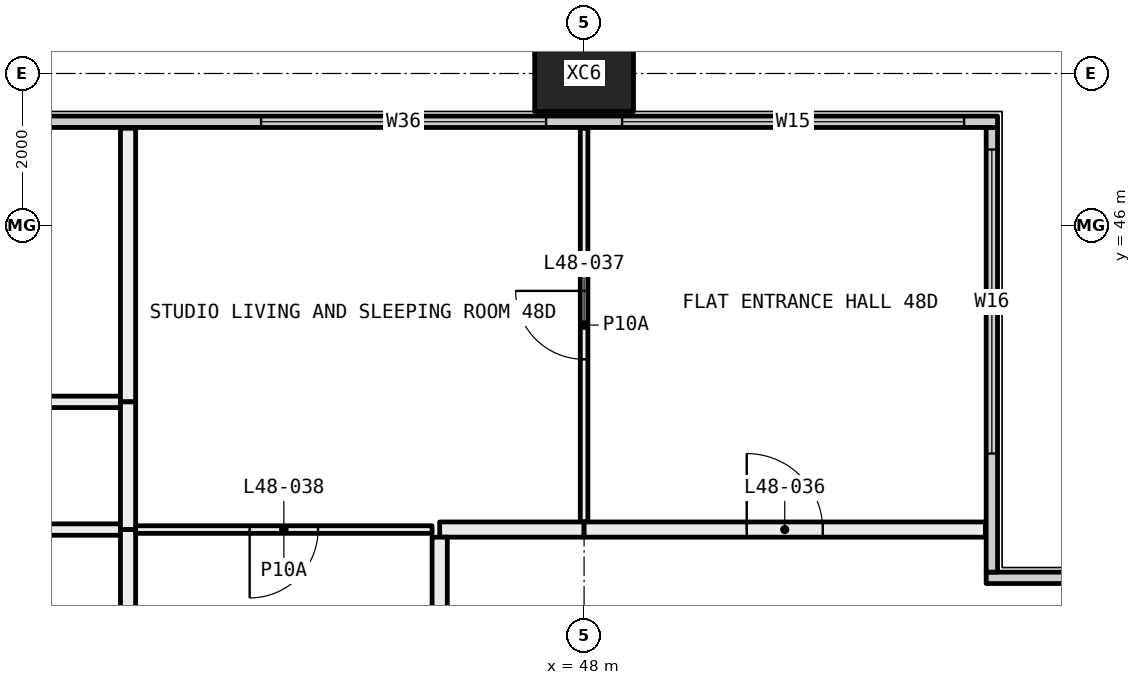
"""IFC4 building model, lengths in metres.
Left out: names, types, materials, properties, quantities, classifications, styles, units other than length and angle.
Written with IfcOpenShell. Run it as: python <this file> out.ifc"""

import sys

from ifc_helpers import new_model, si_unit, direction, frame, frame_2d, origin, origin_2d, place, context, subcontext, project, spatial, rectangle, hollow_rectangle, extrude, element, fill, save


model = new_model("IFC4")
c1 = context("Model", 3, precision=1e-05, world=origin(), true_north=direction((0.0, 1.0)))
c2 = subcontext(c1, "Body", "Model", "MODEL_VIEW")
j1 = project(units=[si_unit("LENGTHUNIT", "METRE"), si_unit("PLANEANGLEUNIT", "RADIAN")], contexts=[c1])
p1 = place(None, origin())
s1 = spatial("IfcSite", under=j1, at=p1, CompositionType="ELEMENT")
p2 = place(p1, origin())
s2 = spatial("IfcBuilding", under=s1, at=p2, CompositionType="ELEMENT")
p3 = place(p2, frame((0.0, 0.0, 182.4)))
s3 = spatial("IfcBuildingStorey", under=s2, at=p3, CompositionType="ELEMENT", Elevation=182.4)
p4 = place(p3, frame((48.0, 48.0, -0.4), z_axis=(0.0, 0.0, 1.0), x_axis=(1.0, 0.0, 0.0)))
e1 = element("IfcColumn", 1, at=p4, inside=s3, PredefinedType="COLUMN", context=c2, shape_type="SweptSolid", body=[
    extrude(hollow_rectangle(XDim=1.3, YDim=1.0, WallThickness=0.05, at=origin_2d()), origin(), (0.0, 0.0, 1.0), 3.45),
])
p5 = place(p3, frame((53.29, 41.365, 0.0), z_axis=(0.0, 0.0, 1.0), x_axis=(1.0, 0.0, 0.0)))
e2 = element("IfcWall", 2, at=p5, inside=s3, PredefinedType="ELEMENTEDWALL", context=c2, shape_type="SweptSolid", body=[
    extrude(rectangle(XDim=6.15, YDim=0.15, at=frame_2d((3.075, 0.0))), origin(), (0.0, 0.0, 1.0), 3.05),
])
p6 = place(p5, frame((1.71, 0.0, 0.45)))
e3 = element("IfcOpeningElement", 3, at=p6, cuts=e2, PredefinedType="OPENING", context=c2, shape_type="SweptSolid", body=[
    extrude(rectangle(XDim=4.0, YDim=2.55, at=frame_2d((2.0, 1.275))), frame((0.0, 0.085, 0.0), z_axis=(0.0, -1.0, 0.0), x_axis=(1.0, 0.0, 0.0)), (0.0, 0.0, 1.0), 0.17),
])
p7 = place(p3, frame((53.365, 41.44, 0.0), z_axis=(0.0, 0.0, 1.0), x_axis=(0.0, 1.0, 0.0)))
e4 = element("IfcWall", 4, at=p7, inside=s3, PredefinedType="ELEMENTEDWALL", context=c2, shape_type="SweptSolid", body=[
    extrude(rectangle(XDim=5.85, YDim=0.15, at=frame_2d((2.925, 0.0))), origin(), (0.0, 0.0, 1.0), 3.05),
])
p8 = place(p7, frame((1.56, 0.0, 0.45)))
e5 = element("IfcOpeningElement", 5, at=p8, cuts=e4, PredefinedType="OPENING", context=c2, shape_type="SweptSolid", body=[
    extrude(rectangle(XDim=4.0, YDim=2.55, at=frame_2d((2.0, 1.275))), frame((0.0, 0.085, 0.0), z_axis=(0.0, -1.0, 0.0), x_axis=(1.0, 0.0, 0.0)), (0.0, 0.0, 1.0), 0.17),
])
p9 = place(p3, frame((6.56, 47.365, 0.0), z_axis=(0.0, 0.0, 1.0), x_axis=(1.0, 0.0, 0.0)))
e6 = element("IfcWall", 6, at=p9, inside=s3, PredefinedType="ELEMENTEDWALL", context=c2, shape_type="SweptSolid", body=[
    extrude(rectangle(XDim=46.88, YDim=0.15, at=frame_2d((23.44, 0.0))), origin(), (0.0, 0.0, 1.0), 3.05),
])
p10 = place(p9, frame((0.44, 0.0, 0.45)))
e7 = element("IfcOpeningElement", 7, at=p10, cuts=e6, PredefinedType="OPENING", context=c2, shape_type="SweptSolid", body=[
    extrude(rectangle(XDim=4.5, YDim=2.55, at=frame_2d((2.25, 1.275))), frame((0.0, 0.085, 0.0), z_axis=(0.0, -1.0, 0.0), x_axis=(1.0, 0.0, 0.0)), (0.0, 0.0, 1.0), 0.17),
])
p11 = place(p9, frame((5.94, 0.0, 0.45)))
e8 = element("IfcOpeningElement", 8, at=p11, cuts=e6, PredefinedType="OPENING", context=c2, shape_type="SweptSolid", body=[
    extrude(rectangle(XDim=3.75, YDim=2.55, at=frame_2d((1.875, 1.275))), frame((0.0, 0.085, 0.0), z_axis=(0.0, -1.0, 0.0), x_axis=(1.0, 0.0, 0.0)), (0.0, 0.0, 1.0), 0.17),
])
p12 = place(p9, frame((13.19, 0.0, 0.45)))
e9 = element("IfcOpeningElement", 9, at=p12, cuts=e6, PredefinedType="OPENING", context=c2, shape_type="SweptSolid", body=[
    extrude(rectangle(XDim=3.75, YDim=2.55, at=frame_2d((1.875, 1.275))), frame((0.0, 0.085, 0.0), z_axis=(0.0, -1.0, 0.0), x_axis=(1.0, 0.0, 0.0)), (0.0, 0.0, 1.0), 0.17),
])
p13 = place(p9, frame((17.94, 0.0, 0.45)))
e10 = element("IfcOpeningElement", 10, at=p13, cuts=e6, PredefinedType="OPENING", context=c2, shape_type="SweptSolid", body=[
    extrude(rectangle(XDim=3.75, YDim=2.55, at=frame_2d((1.875, 1.275))), frame((0.0, 0.085, 0.0), z_axis=(0.0, -1.0, 0.0), x_axis=(1.0, 0.0, 0.0)), (0.0, 0.0, 1.0), 0.17),
])
p14 = place(p9, frame((25.19, 0.0, 0.45)))
e11 = element("IfcOpeningElement", 11, at=p14, cuts=e6, PredefinedType="OPENING", context=c2, shape_type="SweptSolid", body=[
    extrude(rectangle(XDim=0.75, YDim=2.55, at=frame_2d((0.375, 1.275))), frame((0.0, 0.085, 0.0), z_axis=(0.0, -1.0, 0.0), x_axis=(1.0, 0.0, 0.0)), (0.0, 0.0, 1.0), 0.17),
])
p15 = place(p9, frame((26.94, 0.0, 0.45)))
e12 = element("IfcOpeningElement", 12, at=p15, cuts=e6, PredefinedType="OPENING", context=c2, shape_type="SweptSolid", body=[
    extrude(rectangle(XDim=2.0, YDim=2.55, at=frame_2d((1.0, 1.275))), frame((0.0, 0.085, 0.0), z_axis=(0.0, -1.0, 0.0), x_axis=(1.0, 0.0, 0.0)), (0.0, 0.0, 1.0), 0.17),
])
p16 = place(p9, frame((29.94, 0.0, 0.45)))
e13 = element("IfcOpeningElement", 13, at=p16, cuts=e6, PredefinedType="OPENING", context=c2, shape_type="SweptSolid", body=[
    extrude(rectangle(XDim=3.75, YDim=2.55, at=frame_2d((1.875, 1.275))), frame((0.0, 0.085, 0.0), z_axis=(0.0, -1.0, 0.0), x_axis=(1.0, 0.0, 0.0)), (0.0, 0.0, 1.0), 0.17),
])
p17 = place(p9, frame((37.19, 0.0, 0.45)))
e14 = element("IfcOpeningElement", 14, at=p17, cuts=e6, PredefinedType="OPENING", context=c2, shape_type="SweptSolid", body=[
    extrude(rectangle(XDim=3.75, YDim=2.55, at=frame_2d((1.875, 1.275))), frame((0.0, 0.085, 0.0), z_axis=(0.0, -1.0, 0.0), x_axis=(1.0, 0.0, 0.0)), (0.0, 0.0, 1.0), 0.17),
])
p18 = place(p9, frame((41.94, 0.0, 0.45)))
e15 = element("IfcOpeningElement", 15, at=p18, cuts=e6, PredefinedType="OPENING", context=c2, shape_type="SweptSolid", body=[
    extrude(rectangle(XDim=4.5, YDim=2.55, at=frame_2d((2.25, 1.275))), frame((0.0, 0.085, 0.0), z_axis=(0.0, -1.0, 0.0), x_axis=(1.0, 0.0, 0.0)), (0.0, 0.0, 1.0), 0.17),
])
p19 = place(p3, frame((36.075, 43.68, 0.0), z_axis=(0.0, 0.0, 1.0), x_axis=(1.0, 0.0, 0.0)))
e16 = element("IfcWall", 16, at=p19, inside=s3, PredefinedType="PARTITIONING", context=c2, shape_type="SweptSolid", body=[
    extrude(rectangle(XDim=5.825, YDim=0.15, at=frame_2d((2.913, 0.0))), origin(), (0.0, 0.0, 1.0), 2.45),
])
p20 = place(p3, frame((42.0, 43.68, 0.0), z_axis=(0.0, 0.0, 1.0), x_axis=(0.0, 1.0, 0.0)))
e17 = element("IfcWall", 17, at=p20, inside=s3, PredefinedType="PARTITIONING", context=c2, shape_type="SweptSolid", body=[
    extrude(rectangle(XDim=3.6, YDim=0.2, at=frame_2d((1.8, 0.0))), origin(), (0.0, 0.0, 1.0), 3.05),
])
p21 = place(p3, frame((36.075, 42.0, 0.0), z_axis=(0.0, 0.0, 1.0), x_axis=(1.0, 0.0, 0.0)))
e18 = element("IfcWall", 18, at=p21, inside=s3, PredefinedType="PARTITIONING", context=c2, shape_type="SweptSolid", body=[
    extrude(rectangle(XDim=5.825, YDim=0.15, at=frame_2d((2.913, 0.0))), origin(), (0.0, 0.0, 1.0), 2.45),
])
p22 = place(p3, frame((42.0, 42.0, 0.0), z_axis=(0.0, 0.0, 1.0), x_axis=(0.0, 1.0, 0.0)))
e19 = element("IfcWall", 19, at=p22, inside=s3, PredefinedType="PARTITIONING", context=c2, shape_type="SweptSolid", body=[
    extrude(rectangle(XDim=1.68, YDim=0.2, at=frame_2d((0.84, 0.0))), origin(), (0.0, 0.0, 1.0), 3.05),
])
p23 = place(p3, frame((42.0, 36.1, 0.0), z_axis=(0.0, 0.0, 1.0), x_axis=(0.0, 1.0, 0.0)))
e20 = element("IfcWall", 20, at=p23, inside=s3, PredefinedType="PARTITIONING", context=c2, shape_type="SweptSolid", body=[
    extrude(rectangle(XDim=5.9, YDim=0.2, at=frame_2d((2.95, 0.0))), origin(), (0.0, 0.0, 1.0), 3.05),
])
p24 = place(p3, frame((48.0, 42.1, 0.0), z_axis=(0.0, 0.0, 1.0), x_axis=(0.0, 1.0, 0.0)))
e21 = element("IfcWall", 21, at=p24, inside=s3, PredefinedType="PARTITIONING", context=c2, shape_type="SweptSolid", body=[
    extrude(rectangle(XDim=5.18, YDim=0.1, at=frame_2d((2.59, 0.0))), origin(), (0.0, 0.0, 1.0), 3.05),
])
p25 = place(p24, frame((2.14, 0.0, 0.0)))
e22 = element("IfcOpeningElement", 22, at=p25, cuts=e21, PredefinedType="OPENING", context=c2, shape_type="SweptSolid", body=[
    extrude(rectangle(XDim=0.9, YDim=2.1, at=frame_2d((0.45, 1.05))), frame((0.0, 0.06, 0.0), z_axis=(0.0, -1.0, 0.0), x_axis=(1.0, 0.0, 0.0)), (0.0, 0.0, 1.0), 0.12),
])
p26 = place(p3, frame((42.1, 42.0, 0.0), z_axis=(0.0, 0.0, 1.0), x_axis=(1.0, 0.0, 0.0)))
e23 = element("IfcWall", 23, at=p26, inside=s3, PredefinedType="PARTITIONING", context=c2, shape_type="SweptSolid", body=[
    extrude(rectangle(XDim=3.9, YDim=0.1, at=frame_2d((1.95, 0.0))), origin(), (0.0, 0.0, 1.0), 3.05),
])
p27 = place(p26, frame((1.5, 0.0, 0.0)))
e24 = element("IfcOpeningElement", 24, at=p27, cuts=e23, PredefinedType="OPENING", context=c2, shape_type="SweptSolid", body=[
    extrude(rectangle(XDim=0.9, YDim=2.1, at=frame_2d((0.45, 1.05))), frame((0.0, 0.06, 0.0), z_axis=(0.0, -1.0, 0.0), x_axis=(1.0, 0.0, 0.0)), (0.0, 0.0, 1.0), 0.12),
])
p28 = place(p3, frame((46.1, 42.0, 0.0), z_axis=(0.0, 0.0, 1.0), x_axis=(1.0, 0.0, 0.0)))
e25 = element("IfcWall", 25, at=p28, inside=s3, PredefinedType="PARTITIONING", context=c2, shape_type="SweptSolid", body=[
    extrude(rectangle(XDim=1.9, YDim=0.2, at=frame_2d((0.95, 0.0))), origin(), (0.0, 0.0, 1.0), 3.05),
])
p29 = place(p3, frame((48.0, 42.0, 0.0), z_axis=(0.0, 0.0, 1.0), x_axis=(1.0, 0.0, 0.0)))
e26 = element("IfcWall", 26, at=p29, inside=s3, PredefinedType="PARTITIONING", context=c2, shape_type="SweptSolid", body=[
    extrude(rectangle(XDim=5.28, YDim=0.2, at=frame_2d((2.64, 0.0))), origin(), (0.0, 0.0, 1.0), 3.05),
])
p30 = place(p29, frame((2.14, 0.0, 0.0)))
e27 = element("IfcOpeningElement", 27, at=p30, cuts=e26, PredefinedType="OPENING", context=c2, shape_type="SweptSolid", body=[
    extrude(rectangle(XDim=1.0, YDim=2.1, at=frame_2d((0.5, 1.05))), frame((0.0, 0.11, 0.0), z_axis=(0.0, -1.0, 0.0), x_axis=(1.0, 0.0, 0.0)), (0.0, 0.0, 1.0), 0.22),
])
p31 = place(p3, frame((46.1, 36.1, 0.0), z_axis=(0.0, 0.0, 1.0), x_axis=(0.0, 1.0, 0.0)))
e28 = element("IfcWall", 28, at=p31, inside=s3, PredefinedType="PARTITIONING", context=c2, shape_type="SweptSolid", body=[
    extrude(rectangle(XDim=5.8, YDim=0.2, at=frame_2d((2.9, 0.0))), origin(), (0.0, 0.0, 1.0), 3.05),
])
p32 = place(p8, origin())
e29 = element("IfcWindow", 29, at=p32, inside=s3, PartitioningType="SINGLE_PANEL", PredefinedType="WINDOW", context=c2, shape_type="SweptSolid", body=[
    extrude(rectangle(XDim=4.0, YDim=2.55, at=frame_2d((2.0, 1.275))), frame((0.0, 0.03, 0.0), z_axis=(0.0, -1.0, 0.0), x_axis=(1.0, 0.0, 0.0)), (0.0, 0.0, 1.0), 0.06),
])
fill(e5, e29)
p33 = place(p17, origin())
e30 = element("IfcWindow", 30, at=p33, inside=s3, PartitioningType="SINGLE_PANEL", PredefinedType="WINDOW", context=c2, shape_type="SweptSolid", body=[
    extrude(rectangle(XDim=3.75, YDim=2.55, at=frame_2d((1.875, 1.275))), frame((0.0, 0.03, 0.0), z_axis=(0.0, -1.0, 0.0), x_axis=(1.0, 0.0, 0.0)), (0.0, 0.0, 1.0), 0.06),
])
fill(e14, e30)
p34 = place(p18, origin())
e31 = element("IfcWindow", 31, at=p34, inside=s3, PartitioningType="SINGLE_PANEL", PredefinedType="WINDOW", context=c2, shape_type="SweptSolid", body=[
    extrude(rectangle(XDim=4.5, YDim=2.55, at=frame_2d((2.25, 1.275))), frame((0.0, 0.03, 0.0), z_axis=(0.0, -1.0, 0.0), x_axis=(1.0, 0.0, 0.0)), (0.0, 0.0, 1.0), 0.06),
])
fill(e15, e31)
p35 = place(p30, origin())
e32 = element("IfcDoor", 32, at=p35, inside=s3, OperationType="SINGLE_SWING_RIGHT", PredefinedType="DOOR", context=c2, shape_type="SweptSolid", body=[
    extrude(rectangle(XDim=1.0, YDim=2.1, at=frame_2d((0.5, 1.05))), frame((0.0, 0.025, 0.0), z_axis=(0.0, -1.0, 0.0), x_axis=(1.0, 0.0, 0.0)), (0.0, 0.0, 1.0), 0.05),
])
fill(e27, e32)
p36 = place(p25, origin())
e33 = element("IfcDoor", 33, at=p36, inside=s3, OperationType="SINGLE_SWING_LEFT", PredefinedType="DOOR", context=c2, shape_type="SweptSolid", body=[
    extrude(rectangle(XDim=0.9, YDim=2.1, at=frame_2d((0.45, 1.05))), frame((0.0, 0.025, 0.0), z_axis=(0.0, -1.0, 0.0), x_axis=(1.0, 0.0, 0.0)), (0.0, 0.0, 1.0), 0.05),
])
fill(e22, e33)
p37 = place(p27, frame((0.9, 0.0, 0.0), x_axis=(-1.0, 0.0, 0.0)))
e34 = element("IfcDoor", 34, at=p37, inside=s3, OperationType="SINGLE_SWING_LEFT", PredefinedType="DOOR", context=c2, shape_type="SweptSolid", body=[
    extrude(rectangle(XDim=0.9, YDim=2.1, at=frame_2d((0.45, 1.05))), frame((0.0, 0.025, 0.0), z_axis=(0.0, -1.0, 0.0), x_axis=(1.0, 0.0, 0.0)), (0.0, 0.0, 1.0), 0.05),
])
fill(e24, e34)
save(model, sys.argv[1])
